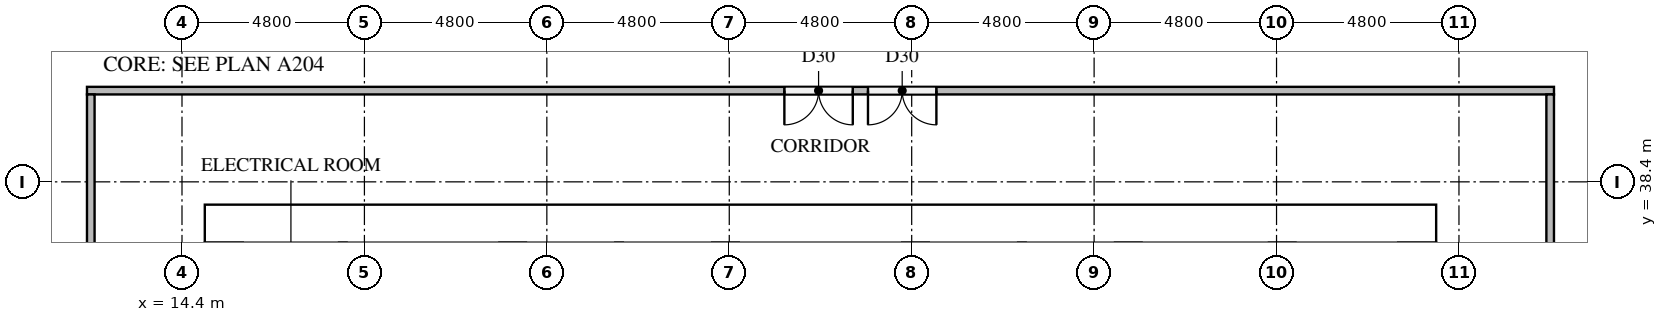
"""IFC4 building model, lengths in metres.
Left out: names, types, materials, properties, quantities, classifications, styles, units other than length and angle.
Written with IfcOpenShell. Run it as: python <this file> out.ifc"""

import sys

from ifc_helpers import new_model, si_unit, direction, frame, frame_2d, origin, place, context, subcontext, project, spatial, rectangle, extrude, element, fill, save


model = new_model("IFC4")
c1 = context("Model", 3, precision=1e-05, world=origin(), true_north=direction((0.0, 1.0)))
c2 = subcontext(c1, "Body", "Model", "MODEL_VIEW")
j1 = project(units=[si_unit("LENGTHUNIT", "METRE"), si_unit("PLANEANGLEUNIT", "RADIAN")], contexts=[c1])
p1 = place(None, origin())
s1 = spatial("IfcSite", under=j1, at=p1, CompositionType="ELEMENT")
p2 = place(p1, origin())
s2 = spatial("IfcBuilding", under=s1, at=p2, CompositionType="ELEMENT")
p3 = place(p2, frame((0.0, 0.0, 15.0)))
s3 = spatial("IfcBuildingStorey", under=s2, at=p3, CompositionType="ELEMENT", Elevation=15.0)
p4 = place(p3, frame((15.0, 37.3, 0.0), z_axis=(0.0, 0.0, 1.0), x_axis=(1.0, 0.0, 0.0)))
e1 = element("IfcWall", 1, at=p4, inside=s3, PredefinedType="SHEAR", context=c2, shape_type="SweptSolid", body=[
    extrude(rectangle(XDim=32.4, YDim=1.0, at=frame_2d((16.2, 0.0))), origin(), (0.0, 0.0, 1.0), 4.2),
])
p5 = place(p4, frame((15.3, 0.0, 0.0)))
e2 = element("IfcOpeningElement", 2, at=p5, cuts=e1, PredefinedType="OPENING", context=c2, shape_type="SweptSolid", body=[
    extrude(rectangle(XDim=1.8, YDim=2.1, at=frame_2d((0.9, 1.05))), frame((0.0, 0.51, 0.0), z_axis=(0.0, -1.0, 0.0), x_axis=(1.0, 0.0, 0.0)), (0.0, 0.0, 1.0), 1.02),
])
p6 = place(p4, frame((1.766, 0.0, 0.0)))
e3 = element("IfcOpeningElement", 3, at=p6, cuts=e1, PredefinedType="OPENING", context=c2, shape_type="SweptSolid", body=[
    extrude(rectangle(XDim=1.0, YDim=2.1, at=frame_2d((0.5, 1.05))), frame((0.0, 0.51, 0.0), z_axis=(0.0, -1.0, 0.0), x_axis=(1.0, 0.0, 0.0)), (0.0, 0.0, 1.0), 1.02),
])
p7 = place(p4, frame((5.241, 0.0, 0.0)))
e4 = element("IfcOpeningElement", 4, at=p7, cuts=e1, PredefinedType="OPENING", context=c2, shape_type="SweptSolid", body=[
    extrude(rectangle(XDim=1.0, YDim=2.1, at=frame_2d((0.5, 1.05))), frame((0.0, 0.51, 0.0), z_axis=(0.0, -1.0, 0.0), x_axis=(1.0, 0.0, 0.0)), (0.0, 0.0, 1.0), 1.02),
])
for number, where, z_axis, x_axis in (
    (5, (28.7, 33.9, 0.0), (0.0, 0.0, 1.0), (0.0, 1.0, 0.0)),
    (6, (33.7, 33.9, 0.0), (0.0, 0.0, 1.0), (0.0, 1.0, 0.0)),
):
    element("IfcWall", number, at=place(p3, frame(where, z_axis=z_axis, x_axis=x_axis)), inside=s3, PredefinedType="SHEAR", context=c2, shape_type="SweptSolid", body=[
        extrude(rectangle(XDim=2.9, YDim=0.7, at=frame_2d((1.45, 0.0))), origin(), (0.0, 0.0, 1.0), 4.2),
    ])
for number, where, z_axis, x_axis in (
    (7, (25.9, 33.9, 0.0), (0.0, 0.0, 1.0), (0.0, 1.0, 0.0)),
    (8, (36.5, 33.9, 0.0), (0.0, 0.0, 1.0), (0.0, 1.0, 0.0)),
):
    element("IfcWall", number, at=place(p3, frame(where, z_axis=z_axis, x_axis=x_axis)), inside=s3, PredefinedType="SOLIDWALL", context=c2, shape_type="SweptSolid", body=[
        extrude(rectangle(XDim=2.9, YDim=0.2, at=frame_2d((1.45, 0.0))), origin(), (0.0, 0.0, 1.0), 4.2),
    ])
p8 = place(p3, frame((18.633, 31.6, 0.0), z_axis=(0.0, 0.0, 1.0), x_axis=(0.0, 1.0, 0.0)))
e9 = element("IfcWall", 9, at=p8, inside=s3, PredefinedType="PARTITIONING", context=c2, shape_type="SweptSolid", body=[
    extrude(rectangle(XDim=5.2, YDim=0.2, at=frame_2d((2.6, 0.0))), origin(), (0.0, 0.0, 1.0), 4.2),
])
p9 = place(p3, frame((50.5, 40.8, 0.0), z_axis=(0.0, 0.0, 1.0), x_axis=(-1.0, 0.0, 0.0)))
e10 = element("IfcWall", 10, at=p9, inside=s3, PredefinedType="PARTITIONING", context=c2, shape_type="SweptSolid", body=[
    extrude(rectangle(XDim=38.6, YDim=0.2, at=frame_2d((19.3, 0.0))), origin(), (0.0, 0.0, 1.0), 4.2),
])
p10 = place(p9, frame((18.45, 0.0, 0.0)))
e11 = element("IfcOpeningElement", 11, at=p10, cuts=e10, PredefinedType="OPENING", context=c2, shape_type="SweptSolid", body=[
    extrude(rectangle(XDim=1.8, YDim=2.1, at=frame_2d((0.9, 1.05))), frame((0.0, 0.11, 0.0), z_axis=(0.0, -1.0, 0.0), x_axis=(1.0, 0.0, 0.0)), (0.0, 0.0, 1.0), 0.22),
])
p11 = place(p9, frame((16.25, 0.0, 0.0)))
e12 = element("IfcOpeningElement", 12, at=p11, cuts=e10, PredefinedType="OPENING", context=c2, shape_type="SweptSolid", body=[
    extrude(rectangle(XDim=1.8, YDim=2.1, at=frame_2d((0.9, 1.05))), frame((0.0, 0.11, 0.0), z_axis=(0.0, -1.0, 0.0), x_axis=(1.0, 0.0, 0.0)), (0.0, 0.0, 1.0), 0.22),
])
p12 = place(p3, frame((12.0, 40.7, 0.0), z_axis=(0.0, 0.0, 1.0), x_axis=(0.0, -1.0, 0.0)))
e13 = element("IfcWall", 13, at=p12, inside=s3, PredefinedType="PARTITIONING", context=c2, shape_type="SweptSolid", body=[
    extrude(rectangle(XDim=28.6, YDim=0.2, at=frame_2d((14.3, 0.0))), origin(), (0.0, 0.0, 1.0), 4.2),
])
p13 = place(p12, frame((6.85, 0.0, 0.0)))
e14 = element("IfcOpeningElement", 14, at=p13, cuts=e13, PredefinedType="OPENING", context=c2, shape_type="SweptSolid", body=[
    extrude(rectangle(XDim=1.8, YDim=2.1, at=frame_2d((0.9, 1.05))), frame((0.0, 0.11, 0.0), z_axis=(0.0, -1.0, 0.0), x_axis=(1.0, 0.0, 0.0)), (0.0, 0.0, 1.0), 0.22),
])
p14 = place(p3, frame((50.4, 12.1, 0.0), z_axis=(0.0, 0.0, 1.0), x_axis=(0.0, 1.0, 0.0)))
e15 = element("IfcWall", 15, at=p14, inside=s3, PredefinedType="PARTITIONING", context=c2, shape_type="SweptSolid", body=[
    extrude(rectangle(XDim=28.6, YDim=0.2, at=frame_2d((14.3, 0.0))), origin(), (0.0, 0.0, 1.0), 4.2),
])
p15 = place(p14, frame((20.05, 0.0, 0.0)))
e16 = element("IfcOpeningElement", 16, at=p15, cuts=e15, PredefinedType="OPENING", context=c2, shape_type="SweptSolid", body=[
    extrude(rectangle(XDim=1.8, YDim=2.1, at=frame_2d((0.9, 1.05))), frame((0.0, 0.11, 0.0), z_axis=(0.0, -1.0, 0.0), x_axis=(1.0, 0.0, 0.0)), (0.0, 0.0, 1.0), 0.22),
])
p16 = place(p5, origin())
e17 = element("IfcDoor", 17, at=p16, inside=s3, OperationType="DOUBLE_DOOR_SINGLE_SWING", PredefinedType="DOOR", context=c2, shape_type="SweptSolid", body=[
    extrude(rectangle(XDim=1.8, YDim=2.1, at=frame_2d((0.9, 1.05))), frame((0.0, 0.025, 0.0), z_axis=(0.0, -1.0, 0.0), x_axis=(1.0, 0.0, 0.0)), (0.0, 0.0, 1.0), 0.05),
])
fill(e2, e17)
p17 = place(p6, origin())
e18 = element("IfcDoor", 18, at=p17, inside=s3, OperationType="SINGLE_SWING_RIGHT", PredefinedType="DOOR", context=c2, shape_type="SweptSolid", body=[
    extrude(rectangle(XDim=1.0, YDim=2.1, at=frame_2d((0.5, 1.05))), frame((0.0, 0.025, 0.0), z_axis=(0.0, -1.0, 0.0), x_axis=(1.0, 0.0, 0.0)), (0.0, 0.0, 1.0), 0.05),
])
fill(e3, e18)
p18 = place(p7, origin())
e19 = element("IfcDoor", 19, at=p18, inside=s3, OperationType="SINGLE_SWING_LEFT", PredefinedType="DOOR", context=c2, shape_type="SweptSolid", body=[
    extrude(rectangle(XDim=1.0, YDim=2.1, at=frame_2d((0.5, 1.05))), frame((0.0, 0.025, 0.0), z_axis=(0.0, -1.0, 0.0), x_axis=(1.0, 0.0, 0.0)), (0.0, 0.0, 1.0), 0.05),
])
fill(e4, e19)
p19 = place(p10, origin())
e20 = element("IfcDoor", 20, at=p19, inside=s3, OperationType="DOUBLE_DOOR_SINGLE_SWING", PredefinedType="DOOR", context=c2, shape_type="SweptSolid", body=[
    extrude(rectangle(XDim=1.8, YDim=2.1, at=frame_2d((0.9, 1.05))), frame((0.0, 0.025, 0.0), z_axis=(0.0, -1.0, 0.0), x_axis=(1.0, 0.0, 0.0)), (0.0, 0.0, 1.0), 0.05),
])
fill(e11, e20)
p20 = place(p11, origin())
e21 = element("IfcDoor", 21, at=p20, inside=s3, OperationType="DOUBLE_DOOR_SINGLE_SWING", PredefinedType="DOOR", context=c2, shape_type="SweptSolid", body=[
    extrude(rectangle(XDim=1.8, YDim=2.1, at=frame_2d((0.9, 1.05))), frame((0.0, 0.025, 0.0), z_axis=(0.0, -1.0, 0.0), x_axis=(1.0, 0.0, 0.0)), (0.0, 0.0, 1.0), 0.05),
])
fill(e12, e21)
save(model, sys.argv[1])
